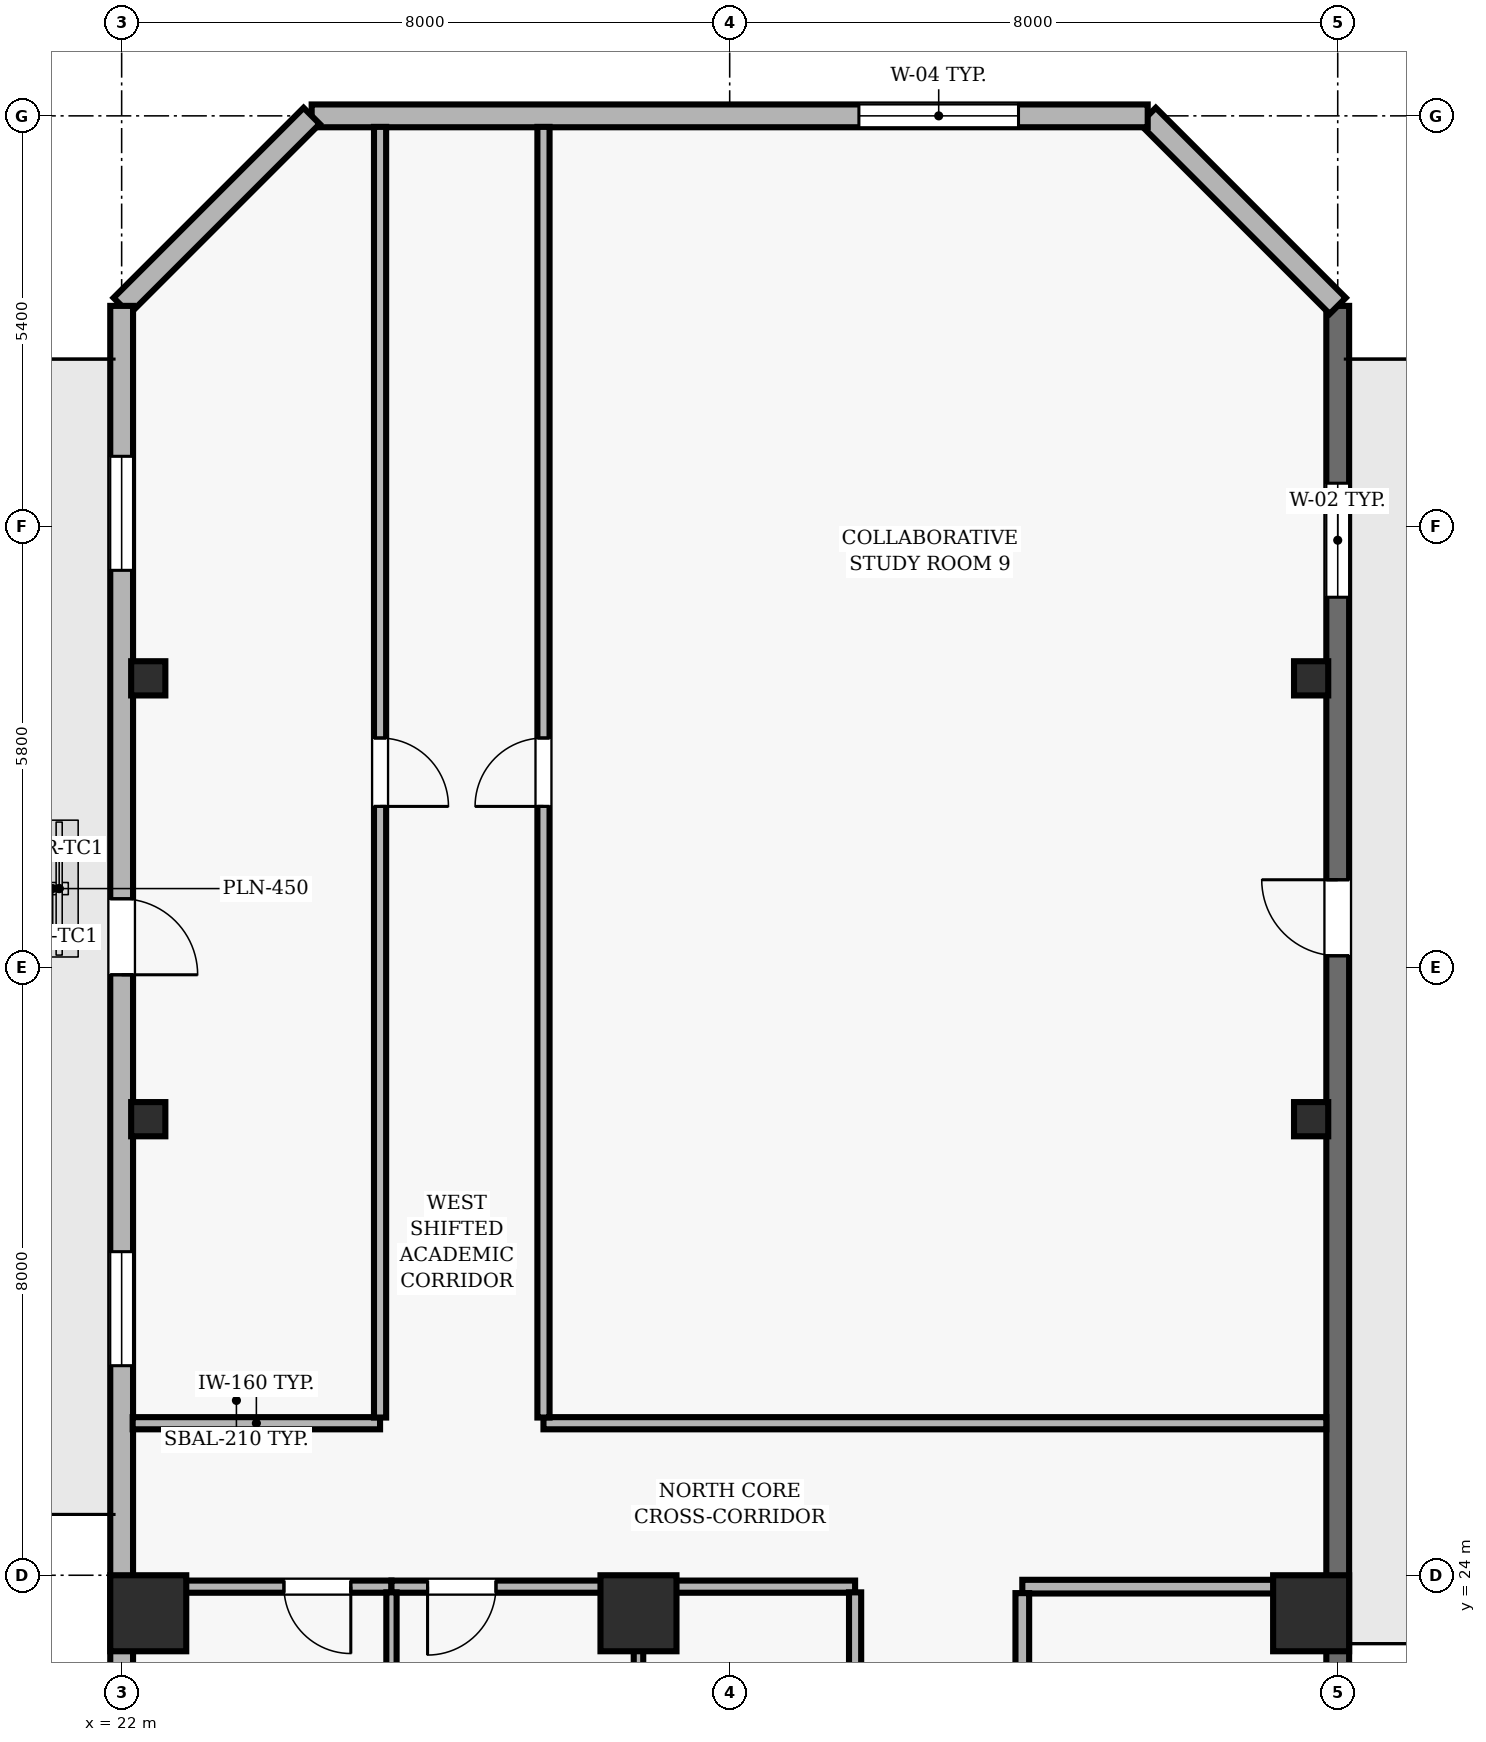
"""IFC4 building model, lengths in metres.
Left out: names, types, materials, properties, quantities, classifications, styles, units other than length and angle.
Written with IfcOpenShell. Run it as: python <this file> out.ifc"""

import sys

from ifc_helpers import new_model, si_unit, direction, frame, frame_2d, origin, origin_2d, place, context, subcontext, project, spatial, rectangle, hollow_rectangle, extrude, element, fill, save


model = new_model("IFC4")
c1 = context("Model", 3, precision=1e-05, world=origin(), true_north=direction((0.0, 1.0)))
c2 = subcontext(c1, "Body", "Model", "MODEL_VIEW")
j1 = project(units=[si_unit("LENGTHUNIT", "METRE"), si_unit("PLANEANGLEUNIT", "RADIAN")], contexts=[c1])
p1 = place(None, origin())
s1 = spatial("IfcSite", under=j1, at=p1, CompositionType="ELEMENT")
p2 = place(p1, origin())
s2 = spatial("IfcBuilding", under=s1, at=p2, CompositionType="ELEMENT")
p3 = place(p2, frame((0.0, 0.0, 218.7)))
s3 = spatial("IfcBuildingStorey", under=s2, at=p3, CompositionType="ELEMENT", Elevation=218.7)
for number, where, z_axis, x_axis in (
    (1, (22.35, 23.5, 0.0), (0.0, 0.0, 1.0), (1.0, 0.0, 0.0)),
    (2, (28.8, 23.5, 0.0), (0.0, 0.0, 1.0), (1.0, 0.0, 0.0)),
    (3, (37.65, 23.5, 0.0), (0.0, 0.0, 1.0), (1.0, 0.0, 0.0)),
):
    element("IfcColumn", number, at=place(p3, frame(where, z_axis=z_axis, x_axis=x_axis)), inside=s3, PredefinedType="COLUMN", context=c2, shape_type="SweptSolid", body=[
        extrude(rectangle(XDim=1.0, YDim=1.0, at=origin_2d()), origin(), (0.0, 0.0, 1.0), 3.9),
    ])
for number, where, z_axis, x_axis in (
    (4, (22.35, 30.0, 0.0), (0.0, 0.0, 1.0), (1.0, 0.0, 0.0)),
    (5, (37.65, 30.0, 0.0), (0.0, 0.0, 1.0), (1.0, 0.0, 0.0)),
    (6, (22.35, 35.8, 0.0), (0.0, 0.0, 1.0), (1.0, 0.0, 0.0)),
    (7, (37.65, 35.8, 0.0), (0.0, 0.0, 1.0), (1.0, 0.0, 0.0)),
):
    element("IfcColumn", number, at=place(p3, frame(where, z_axis=z_axis, x_axis=x_axis)), inside=s3, PredefinedType="COLUMN", context=c2, shape_type="SweptSolid", body=[
        extrude(hollow_rectangle(XDim=0.45, YDim=0.45, WallThickness=0.02, at=origin_2d()), origin(), (0.0, 0.0, 1.0), 3.9),
    ])
p4 = place(p3, frame((38.0, 22.2, 0.0), z_axis=(0.0, 0.0, 1.0), x_axis=(0.0, 1.0, 0.0)))
e8 = element("IfcWall", 8, at=p4, inside=s3, PredefinedType="SOLIDWALL", context=c2, shape_type="SweptSolid", body=[
    extrude(rectangle(XDim=18.5, YDim=0.3, at=frame_2d((9.25, 0.0))), origin(), (0.0, 0.0, 1.0), 3.69),
])
p5 = place(p4, frame((9.95, 0.0, 0.0)))
e9 = element("IfcOpeningElement", 9, at=p5, cuts=e8, PredefinedType="OPENING", context=c2, shape_type="SweptSolid", body=[
    extrude(rectangle(XDim=1.0, YDim=2.2, at=frame_2d((0.5, 1.1))), frame((0.0, 0.16, 0.0), z_axis=(0.0, -1.0, 0.0), x_axis=(1.0, 0.0, 0.0)), (0.0, 0.0, 1.0), 0.32),
])
p6 = place(p4, frame((14.667, 0.0, 0.9)))
e10 = element("IfcOpeningElement", 10, at=p6, cuts=e8, PredefinedType="OPENING", context=c2, shape_type="SweptSolid", body=[
    extrude(rectangle(XDim=1.5, YDim=1.6, at=frame_2d((0.75, 0.8))), frame((0.0, 0.16, 0.0), z_axis=(0.0, -1.0, 0.0), x_axis=(1.0, 0.0, 0.0)), (0.0, 0.0, 1.0), 0.32),
])
p7 = place(p3, frame((38.0, 40.7, 0.0), z_axis=(0.0, 0.0, 1.0), x_axis=(-0.707106781187, 0.707106781187, 0.0)))
e11 = element("IfcWall", 11, at=p7, inside=s3, PredefinedType="SOLIDWALL", context=c2, shape_type="SweptSolid", body=[
    extrude(rectangle(XDim=3.536, YDim=0.3, at=frame_2d((1.768, 0.0))), origin(), (0.0, 0.0, 1.0), 3.69),
])
p8 = place(p3, frame((35.5, 43.2, 0.0), z_axis=(0.0, 0.0, 1.0), x_axis=(-1.0, 0.0, 0.0)))
e12 = element("IfcWall", 12, at=p8, inside=s3, PredefinedType="SOLIDWALL", context=c2, shape_type="SweptSolid", body=[
    extrude(rectangle(XDim=11.0, YDim=0.3, at=frame_2d((5.5, 0.0))), origin(), (0.0, 0.0, 1.0), 3.69),
])
p9 = place(p8, frame((1.7, 0.0, 0.9)))
e13 = element("IfcOpeningElement", 13, at=p9, cuts=e12, PredefinedType="OPENING", context=c2, shape_type="SweptSolid", body=[
    extrude(rectangle(XDim=2.1, YDim=1.6, at=frame_2d((1.05, 0.8))), frame((0.0, 0.16, 0.0), z_axis=(0.0, -1.0, 0.0), x_axis=(1.0, 0.0, 0.0)), (0.0, 0.0, 1.0), 0.32),
])
p10 = place(p3, frame((24.5, 43.2, 0.0), z_axis=(0.0, 0.0, 1.0), x_axis=(-0.707106781187, -0.707106781187, 0.0)))
e14 = element("IfcWall", 14, at=p10, inside=s3, PredefinedType="SOLIDWALL", context=c2, shape_type="SweptSolid", body=[
    extrude(rectangle(XDim=3.536, YDim=0.3, at=frame_2d((1.768, 0.0))), origin(), (0.0, 0.0, 1.0), 3.69),
])
p11 = place(p3, frame((22.0, 40.7, 0.0), z_axis=(0.0, 0.0, 1.0), x_axis=(0.0, -1.0, 0.0)))
e15 = element("IfcWall", 15, at=p11, inside=s3, PredefinedType="SOLIDWALL", context=c2, shape_type="SweptSolid", body=[
    extrude(rectangle(XDim=38.2, YDim=0.3, at=frame_2d((19.1, 0.0))), origin(), (0.0, 0.0, 1.0), 3.69),
])
p12 = place(p11, frame((7.8, 0.0, 0.0)))
e16 = element("IfcOpeningElement", 16, at=p12, cuts=e15, PredefinedType="OPENING", context=c2, shape_type="SweptSolid", body=[
    extrude(rectangle(XDim=1.0, YDim=2.2, at=frame_2d((0.5, 1.1))), frame((0.0, 0.16, 0.0), z_axis=(0.0, -1.0, 0.0), x_axis=(1.0, 0.0, 0.0)), (0.0, 0.0, 1.0), 0.32),
])
p13 = place(p11, frame((1.979, 0.0, 0.9)))
e17 = element("IfcOpeningElement", 17, at=p13, cuts=e15, PredefinedType="OPENING", context=c2, shape_type="SweptSolid", body=[
    extrude(rectangle(XDim=1.5, YDim=1.8, at=frame_2d((0.75, 0.9))), frame((0.0, 0.16, 0.0), z_axis=(0.0, -1.0, 0.0), x_axis=(1.0, 0.0, 0.0)), (0.0, 0.0, 1.0), 0.32),
])
p14 = place(p11, frame((12.443, 0.0, 0.9)))
e18 = element("IfcOpeningElement", 18, at=p14, cuts=e15, PredefinedType="OPENING", context=c2, shape_type="SweptSolid", body=[
    extrude(rectangle(XDim=1.5, YDim=1.8, at=frame_2d((0.75, 0.9))), frame((0.0, 0.16, 0.0), z_axis=(0.0, -1.0, 0.0), x_axis=(1.0, 0.0, 0.0)), (0.0, 0.0, 1.0), 0.32),
])
p15 = place(p11, frame((18.35, 0.0, 0.9)))
e19 = element("IfcOpeningElement", 19, at=p15, cuts=e15, PredefinedType="OPENING", context=c2, shape_type="SweptSolid", body=[
    extrude(rectangle(XDim=1.5, YDim=1.8, at=frame_2d((0.75, 0.9))), frame((0.0, 0.16, 0.0), z_axis=(0.0, -1.0, 0.0), x_axis=(1.0, 0.0, 0.0)), (0.0, 0.0, 1.0), 0.32),
])
p16 = place(p11, frame((23.807, 0.0, 0.9)))
e20 = element("IfcOpeningElement", 20, at=p16, cuts=e15, PredefinedType="OPENING", context=c2, shape_type="SweptSolid", body=[
    extrude(rectangle(XDim=1.5, YDim=1.8, at=frame_2d((0.75, 0.9))), frame((0.0, 0.16, 0.0), z_axis=(0.0, -1.0, 0.0), x_axis=(1.0, 0.0, 0.0)), (0.0, 0.0, 1.0), 0.32),
])
p17 = place(p11, frame((29.264, 0.0, 0.9)))
e21 = element("IfcOpeningElement", 21, at=p17, cuts=e15, PredefinedType="OPENING", context=c2, shape_type="SweptSolid", body=[
    extrude(rectangle(XDim=1.5, YDim=1.8, at=frame_2d((0.75, 0.9))), frame((0.0, 0.16, 0.0), z_axis=(0.0, -1.0, 0.0), x_axis=(1.0, 0.0, 0.0)), (0.0, 0.0, 1.0), 0.32),
])
p18 = place(p3, frame((25.4, 26.0, 0.0), z_axis=(0.0, 0.0, 1.0), x_axis=(-1.0, 0.0, 0.0)))
e22 = element("IfcWall", 22, at=p18, inside=s3, PredefinedType="PARTITIONING", context=c2, shape_type="SweptSolid", body=[
    extrude(rectangle(XDim=3.255, YDim=0.16, at=frame_2d((1.627, 0.0))), origin(), (0.0, 0.0, 1.0), 3.69),
])
p19 = place(p3, frame((25.55, 23.85, 0.0), z_axis=(0.0, 0.0, 1.0), x_axis=(-1.0, 0.0, 0.0)))
e23 = element("IfcWall", 23, at=p19, inside=s3, PredefinedType="PARTITIONING", context=c2, shape_type="SweptSolid", body=[
    extrude(rectangle(XDim=3.35, YDim=0.16, at=frame_2d((1.675, 0.0))), origin(), (0.0, 0.0, 1.0), 3.146),
])
p20 = place(p19, frame((0.535, 0.0, 0.0)))
e24 = element("IfcOpeningElement", 24, at=p20, cuts=e23, PredefinedType="OPENING", context=c2, shape_type="SweptSolid", body=[
    extrude(rectangle(XDim=0.88, YDim=2.1, at=frame_2d((0.44, 1.05))), frame((0.0, 0.09, 0.0), z_axis=(0.0, -1.0, 0.0), x_axis=(1.0, 0.0, 0.0)), (0.0, 0.0, 1.0), 0.18),
])
p21 = place(p3, frame((28.8, 23.85, 0.0), z_axis=(0.0, 0.0, 1.0), x_axis=(-1.0, 0.0, 0.0)))
e25 = element("IfcWall", 25, at=p21, inside=s3, PredefinedType="PARTITIONING", context=c2, shape_type="SweptSolid", body=[
    extrude(rectangle(XDim=3.25, YDim=0.16, at=frame_2d((1.625, 0.0))), origin(), (0.0, 0.0, 1.0), 3.146),
])
p22 = place(p21, frame((1.875, 0.0, 0.0)))
e26 = element("IfcOpeningElement", 26, at=p22, cuts=e25, PredefinedType="OPENING", context=c2, shape_type="SweptSolid", body=[
    extrude(rectangle(XDim=0.9, YDim=2.1, at=frame_2d((0.45, 1.05))), frame((0.0, 0.09, 0.0), z_axis=(0.0, -1.0, 0.0), x_axis=(1.0, 0.0, 0.0)), (0.0, 0.0, 1.0), 0.18),
])
p23 = place(p3, frame((31.65, 23.85, 0.0), z_axis=(0.0, 0.0, 1.0), x_axis=(-1.0, 0.0, 0.0)))
e27 = element("IfcWall", 27, at=p23, inside=s3, PredefinedType="PARTITIONING", context=c2, shape_type="SweptSolid", body=[
    extrude(rectangle(XDim=2.85, YDim=0.16, at=frame_2d((1.425, 0.0))), origin(), (0.0, 0.0, 1.0), 3.146),
])
p24 = place(p3, frame((37.85, 23.85, 0.0), z_axis=(0.0, 0.0, 1.0), x_axis=(-1.0, 0.0, 0.0)))
e28 = element("IfcWall", 28, at=p24, inside=s3, PredefinedType="PARTITIONING", context=c2, shape_type="SweptSolid", body=[
    extrude(rectangle(XDim=4.0, YDim=0.18, at=frame_2d((2.0, 0.0))), origin(), (0.0, 0.0, 1.0), 3.146),
])
p25 = place(p3, frame((37.85, 26.0, 0.0), z_axis=(0.0, 0.0, 1.0), x_axis=(-1.0, 0.0, 0.0)))
e29 = element("IfcWall", 29, at=p25, inside=s3, PredefinedType="PARTITIONING", context=c2, shape_type="SweptSolid", body=[
    extrude(rectangle(XDim=10.3, YDim=0.16, at=frame_2d((5.15, 0.0))), origin(), (0.0, 0.0, 1.0), 3.69),
])
p26 = place(p3, frame((25.4, 43.055, 0.0), z_axis=(0.0, 0.0, 1.0), x_axis=(0.0, -1.0, 0.0)))
e30 = element("IfcWall", 30, at=p26, inside=s3, PredefinedType="PARTITIONING", context=c2, shape_type="SweptSolid", body=[
    extrude(rectangle(XDim=16.98, YDim=0.16, at=frame_2d((8.49, 0.0))), origin(), (0.0, 0.0, 1.0), 3.69),
])
p27 = place(p26, frame((8.04, 0.0, 0.0)))
e31 = element("IfcOpeningElement", 31, at=p27, cuts=e30, PredefinedType="OPENING", context=c2, shape_type="SweptSolid", body=[
    extrude(rectangle(XDim=0.9, YDim=2.1, at=frame_2d((0.45, 1.05))), frame((0.0, 0.09, 0.0), z_axis=(0.0, -1.0, 0.0), x_axis=(1.0, 0.0, 0.0)), (0.0, 0.0, 1.0), 0.18),
])
p28 = place(p3, frame((25.55, 19.16, 0.0), z_axis=(0.0, 0.0, 1.0), x_axis=(0.0, 1.0, 0.0)))
e32 = element("IfcWall", 32, at=p28, inside=s3, PredefinedType="PARTITIONING", context=c2, shape_type="SweptSolid", body=[
    extrude(rectangle(XDim=4.615, YDim=0.135, at=frame_2d((2.308, 0.0))), origin(), (0.0, 0.0, 1.0), 3.69),
])
p29 = place(p3, frame((27.55, 26.075, 0.0), z_axis=(0.0, 0.0, 1.0), x_axis=(0.0, 1.0, 0.0)))
e33 = element("IfcWall", 33, at=p29, inside=s3, PredefinedType="PARTITIONING", context=c2, shape_type="SweptSolid", body=[
    extrude(rectangle(XDim=16.98, YDim=0.16, at=frame_2d((8.49, 0.0))), origin(), (0.0, 0.0, 1.0), 3.69),
])
p30 = place(p29, frame((8.04, 0.0, 0.0)))
e34 = element("IfcOpeningElement", 34, at=p30, cuts=e33, PredefinedType="OPENING", context=c2, shape_type="SweptSolid", body=[
    extrude(rectangle(XDim=0.9, YDim=2.1, at=frame_2d((0.45, 1.05))), frame((0.0, 0.09, 0.0), z_axis=(0.0, -1.0, 0.0), x_axis=(1.0, 0.0, 0.0)), (0.0, 0.0, 1.0), 0.18),
])
p31 = place(p3, frame((28.8, 23.775, 0.0), z_axis=(0.0, 0.0, 1.0), x_axis=(0.0, -1.0, 0.0)))
e35 = element("IfcWall", 35, at=p31, inside=s3, PredefinedType="PARTITIONING", context=c2, shape_type="SweptSolid", body=[
    extrude(rectangle(XDim=4.615, YDim=0.125, at=frame_2d((2.308, 0.0))), origin(), (0.0, 0.0, 1.0), 3.69),
])
p32 = place(p3, frame((31.65, 19.01, 0.0), z_axis=(0.0, 0.0, 1.0), x_axis=(0.0, 1.0, 0.0)))
e36 = element("IfcWall", 36, at=p32, inside=s3, PredefinedType="PARTITIONING", context=c2, shape_type="SweptSolid", body=[
    extrude(rectangle(XDim=4.765, YDim=0.16, at=frame_2d((2.382, 0.0))), origin(), (0.0, 0.0, 1.0), 3.69),
])
p33 = place(p32, frame((1.932, 0.0, 0.0)))
e37 = element("IfcOpeningElement", 37, at=p33, cuts=e36, PredefinedType="OPENING", context=c2, shape_type="SweptSolid", body=[
    extrude(rectangle(XDim=0.9, YDim=2.1, at=frame_2d((0.45, 1.05))), frame((0.0, 0.09, 0.0), z_axis=(0.0, -1.0, 0.0), x_axis=(1.0, 0.0, 0.0)), (0.0, 0.0, 1.0), 0.18),
])
p34 = place(p3, frame((33.85, 17.735, 0.0), z_axis=(0.0, 0.0, 1.0), x_axis=(0.0, 1.0, 0.0)))
e38 = element("IfcWall", 38, at=p34, inside=s3, PredefinedType="PARTITIONING", context=c2, shape_type="SweptSolid", body=[
    extrude(rectangle(XDim=6.03, YDim=0.18, at=frame_2d((3.015, 0.0))), origin(), (0.0, 0.0, 1.0), 3.69),
])
p35 = place(p34, frame((2.54, 0.0, 0.0)))
e39 = element("IfcOpeningElement", 39, at=p35, cuts=e38, PredefinedType="OPENING", context=c2, shape_type="SweptSolid", body=[
    extrude(rectangle(XDim=0.95, YDim=2.1, at=frame_2d((0.475, 1.05))), frame((0.0, 0.1, 0.0), z_axis=(0.0, -1.0, 0.0), x_axis=(1.0, 0.0, 0.0)), (0.0, 0.0, 1.0), 0.2),
])
p36 = place(p5, origin())
e40 = element("IfcDoor", 40, at=p36, inside=s3, OperationType="SINGLE_SWING_RIGHT", PredefinedType="DOOR", context=c2, shape_type="SweptSolid", body=[
    extrude(rectangle(XDim=1.0, YDim=2.2, at=frame_2d((0.5, 1.1))), frame((0.0, 0.025, 0.0), z_axis=(0.0, -1.0, 0.0), x_axis=(1.0, 0.0, 0.0)), (0.0, 0.0, 1.0), 0.05),
])
fill(e9, e40)
p37 = place(p6, origin())
e41 = element("IfcWindow", 41, at=p37, inside=s3, PartitioningType="SINGLE_PANEL", PredefinedType="WINDOW", context=c2, shape_type="SweptSolid", body=[
    extrude(rectangle(XDim=1.5, YDim=1.6, at=frame_2d((0.75, 0.8))), frame((0.0, 0.03, 0.0), z_axis=(0.0, -1.0, 0.0), x_axis=(1.0, 0.0, 0.0)), (0.0, 0.0, 1.0), 0.06),
])
fill(e10, e41)
p38 = place(p9, origin())
e42 = element("IfcWindow", 42, at=p38, inside=s3, PartitioningType="SINGLE_PANEL", PredefinedType="WINDOW", context=c2, shape_type="SweptSolid", body=[
    extrude(rectangle(XDim=2.1, YDim=1.6, at=frame_2d((1.05, 0.8))), frame((0.0, 0.03, 0.0), z_axis=(0.0, -1.0, 0.0), x_axis=(1.0, 0.0, 0.0)), (0.0, 0.0, 1.0), 0.06),
])
fill(e13, e42)
p39 = place(p12, origin())
e43 = element("IfcDoor", 43, at=p39, inside=s3, OperationType="SINGLE_SWING_RIGHT", PredefinedType="DOOR", context=c2, shape_type="SweptSolid", body=[
    extrude(rectangle(XDim=1.0, YDim=2.2, at=frame_2d((0.5, 1.1))), frame((0.0, 0.025, 0.0), z_axis=(0.0, -1.0, 0.0), x_axis=(1.0, 0.0, 0.0)), (0.0, 0.0, 1.0), 0.05),
])
fill(e16, e43)
p40 = place(p13, origin())
e44 = element("IfcWindow", 44, at=p40, inside=s3, PartitioningType="SINGLE_PANEL", PredefinedType="WINDOW", context=c2, shape_type="SweptSolid", body=[
    extrude(rectangle(XDim=1.5, YDim=1.8, at=frame_2d((0.75, 0.9))), frame((0.0, 0.03, 0.0), z_axis=(0.0, -1.0, 0.0), x_axis=(1.0, 0.0, 0.0)), (0.0, 0.0, 1.0), 0.06),
])
fill(e17, e44)
p41 = place(p14, origin())
e45 = element("IfcWindow", 45, at=p41, inside=s3, PartitioningType="SINGLE_PANEL", PredefinedType="WINDOW", context=c2, shape_type="SweptSolid", body=[
    extrude(rectangle(XDim=1.5, YDim=1.8, at=frame_2d((0.75, 0.9))), frame((0.0, 0.03, 0.0), z_axis=(0.0, -1.0, 0.0), x_axis=(1.0, 0.0, 0.0)), (0.0, 0.0, 1.0), 0.06),
])
fill(e18, e45)
p42 = place(p20, origin())
e46 = element("IfcDoor", 46, at=p42, inside=s3, OperationType="SINGLE_SWING_LEFT", PredefinedType="DOOR", context=c2, shape_type="SweptSolid", body=[
    extrude(rectangle(XDim=0.88, YDim=2.1, at=frame_2d((0.44, 1.05))), frame((0.0, 0.025, 0.0), z_axis=(0.0, -1.0, 0.0), x_axis=(1.0, 0.0, 0.0)), (0.0, 0.0, 1.0), 0.05),
])
fill(e24, e46)
p43 = place(p22, origin())
e47 = element("IfcDoor", 47, at=p43, inside=s3, OperationType="SINGLE_SWING_RIGHT", PredefinedType="DOOR", context=c2, shape_type="SweptSolid", body=[
    extrude(rectangle(XDim=0.9, YDim=2.1, at=frame_2d((0.45, 1.05))), frame((0.0, 0.025, 0.0), z_axis=(0.0, -1.0, 0.0), x_axis=(1.0, 0.0, 0.0)), (0.0, 0.0, 1.0), 0.05),
])
fill(e26, e47)
p44 = place(p27, origin())
e48 = element("IfcDoor", 48, at=p44, inside=s3, OperationType="SINGLE_SWING_RIGHT", PredefinedType="DOOR", context=c2, shape_type="SweptSolid", body=[
    extrude(rectangle(XDim=0.9, YDim=2.1, at=frame_2d((0.45, 1.05))), frame((0.0, 0.025, 0.0), z_axis=(0.0, -1.0, 0.0), x_axis=(1.0, 0.0, 0.0)), (0.0, 0.0, 1.0), 0.05),
])
fill(e31, e48)
p45 = place(p30, origin())
e49 = element("IfcDoor", 49, at=p45, inside=s3, OperationType="SINGLE_SWING_LEFT", PredefinedType="DOOR", context=c2, shape_type="SweptSolid", body=[
    extrude(rectangle(XDim=0.9, YDim=2.1, at=frame_2d((0.45, 1.05))), frame((0.0, 0.025, 0.0), z_axis=(0.0, -1.0, 0.0), x_axis=(1.0, 0.0, 0.0)), (0.0, 0.0, 1.0), 0.05),
])
fill(e34, e49)
save(model, sys.argv[1])
